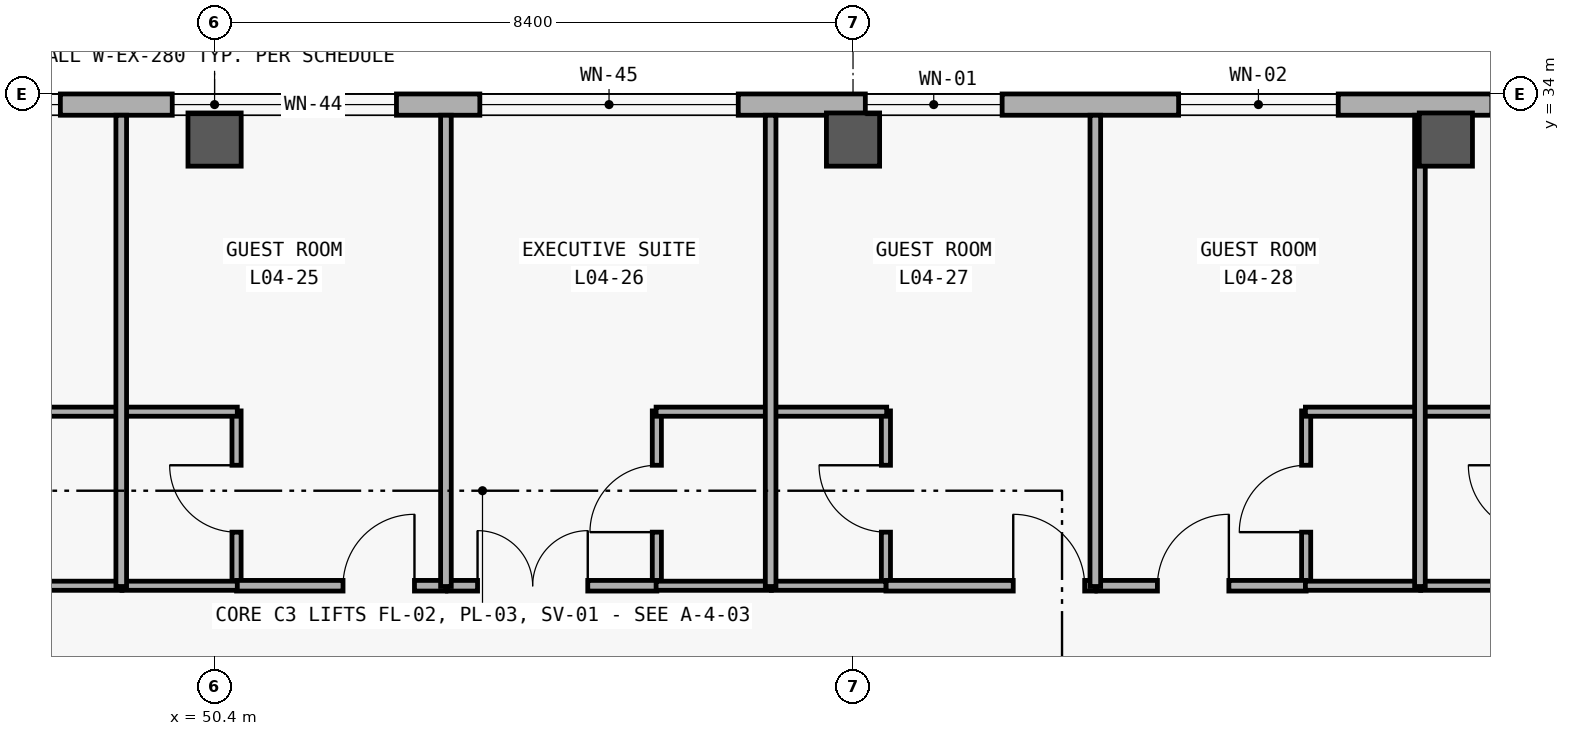
"""IFC4 building model, lengths in metres.
Left out: names, types, materials, properties, quantities, classifications, styles, units other than length and angle.
Written with IfcOpenShell. Run it as: python <this file> out.ifc"""

import sys

from ifc_helpers import new_model, si_unit, direction, frame, frame_2d, origin, origin_2d, place, context, subcontext, project, spatial, rectangle, extrude, element, fill, save


model = new_model("IFC4")
c1 = context("Model", 3, precision=1e-05, world=origin(), true_north=direction((0.0, 1.0)))
c2 = subcontext(c1, "Body", "Model", "MODEL_VIEW")
j1 = project(units=[si_unit("LENGTHUNIT", "METRE"), si_unit("PLANEANGLEUNIT", "RADIAN")], contexts=[c1])
p1 = place(None, origin())
s1 = spatial("IfcSite", under=j1, at=p1, CompositionType="ELEMENT")
p2 = place(p1, origin())
s2 = spatial("IfcBuilding", under=s1, at=p2, CompositionType="ELEMENT")
p3 = place(p2, frame((0.0, 0.0, 19.2)))
s3 = spatial("IfcBuildingStorey", under=s2, at=p3, CompositionType="ELEMENT", Elevation=19.2)
for number, where, z_axis, x_axis in (
    (1, (50.4, 33.4, 0.0), (0.0, 0.0, 1.0), (1.0, 0.0, 0.0)),
    (2, (58.8, 33.4, 0.0), (0.0, 0.0, 1.0), (1.0, 0.0, 0.0)),
    (3, (66.6, 33.4, 0.0), (0.0, 0.0, 1.0), (1.0, 0.0, 0.0)),
):
    element("IfcColumn", number, at=place(p3, frame(where, z_axis=z_axis, x_axis=x_axis)), inside=s3, PredefinedType="COLUMN", context=c2, shape_type="SweptSolid", body=[
        extrude(rectangle(XDim=0.7, YDim=0.7, at=origin_2d()), origin(), (0.0, 0.0, 1.0), 3.6),
    ])
p4 = place(p3, frame((8.68, 33.86, 0.0), z_axis=(0.0, 0.0, 1.0), x_axis=(1.0, 0.0, 0.0)))
e4 = element("IfcWall", 4, at=p4, inside=s3, PredefinedType="SOLIDWALL", context=c2, shape_type="SweptSolid", body=[
    extrude(rectangle(XDim=83.44, YDim=0.28, at=frame_2d((41.72, 0.0))), origin(), (0.0, 0.0, 1.0), 3.32),
])
p5 = place(p4, frame((4.745, 0.0, 0.85)))
e5 = element("IfcOpeningElement", 5, at=p5, cuts=e4, PredefinedType="OPENING", context=c2, shape_type="SweptSolid", body=[
    extrude(rectangle(XDim=1.25, YDim=1.45, at=frame_2d((0.625, 0.725))), frame((0.0, 0.15, 0.0), z_axis=(0.0, -1.0, 0.0), x_axis=(1.0, 0.0, 0.0)), (0.0, 0.0, 1.0), 0.3),
])
p6 = place(p4, frame((11.846, 0.0, 0.85)))
e6 = element("IfcOpeningElement", 6, at=p6, cuts=e4, PredefinedType="OPENING", context=c2, shape_type="SweptSolid", body=[
    extrude(rectangle(XDim=1.78, YDim=1.95, at=frame_2d((0.89, 0.975))), frame((0.0, 0.15, 0.0), z_axis=(0.0, -1.0, 0.0), x_axis=(1.0, 0.0, 0.0)), (0.0, 0.0, 1.0), 0.3),
])
p7 = place(p4, frame((16.068, 0.0, 0.85)))
e7 = element("IfcOpeningElement", 7, at=p7, cuts=e4, PredefinedType="OPENING", context=c2, shape_type="SweptSolid", body=[
    extrude(rectangle(XDim=1.88, YDim=1.95, at=frame_2d((0.94, 0.975))), frame((0.0, 0.15, 0.0), z_axis=(0.0, -1.0, 0.0), x_axis=(1.0, 0.0, 0.0)), (0.0, 0.0, 1.0), 0.3),
])
p8 = place(p4, frame((20.255, 0.0, 0.85)))
e8 = element("IfcOpeningElement", 8, at=p8, cuts=e4, PredefinedType="OPENING", context=c2, shape_type="SweptSolid", body=[
    extrude(rectangle(XDim=2.05, YDim=1.95, at=frame_2d((1.025, 0.975))), frame((0.0, 0.15, 0.0), z_axis=(0.0, -1.0, 0.0), x_axis=(1.0, 0.0, 0.0)), (0.0, 0.0, 1.0), 0.3),
])
p9 = place(p4, frame((24.461, 0.0, 0.85)))
e9 = element("IfcOpeningElement", 9, at=p9, cuts=e4, PredefinedType="OPENING", context=c2, shape_type="SweptSolid", body=[
    extrude(rectangle(XDim=2.18, YDim=1.95, at=frame_2d((1.09, 0.975))), frame((0.0, 0.15, 0.0), z_axis=(0.0, -1.0, 0.0), x_axis=(1.0, 0.0, 0.0)), (0.0, 0.0, 1.0), 0.3),
])
p10 = place(p4, frame((28.633, 0.0, 0.85)))
e10 = element("IfcOpeningElement", 10, at=p10, cuts=e4, PredefinedType="OPENING", context=c2, shape_type="SweptSolid", body=[
    extrude(rectangle(XDim=2.38, YDim=1.95, at=frame_2d((1.19, 0.975))), frame((0.0, 0.15, 0.0), z_axis=(0.0, -1.0, 0.0), x_axis=(1.0, 0.0, 0.0)), (0.0, 0.0, 1.0), 0.3),
])
p11 = place(p4, frame((32.855, 0.0, 0.85)))
e11 = element("IfcOpeningElement", 11, at=p11, cuts=e4, PredefinedType="OPENING", context=c2, shape_type="SweptSolid", body=[
    extrude(rectangle(XDim=2.48, YDim=2.0, at=frame_2d((1.24, 1.0))), frame((0.0, 0.15, 0.0), z_axis=(0.0, -1.0, 0.0), x_axis=(1.0, 0.0, 0.0)), (0.0, 0.0, 1.0), 0.3),
])
p12 = place(p4, frame((37.041, 0.0, 0.85)))
e12 = element("IfcOpeningElement", 12, at=p12, cuts=e4, PredefinedType="OPENING", context=c2, shape_type="SweptSolid", body=[
    extrude(rectangle(XDim=2.65, YDim=2.0, at=frame_2d((1.325, 1.0))), frame((0.0, 0.15, 0.0), z_axis=(0.0, -1.0, 0.0), x_axis=(1.0, 0.0, 0.0)), (0.0, 0.0, 1.0), 0.3),
])
p13 = place(p4, frame((41.163, 0.0, 0.85)))
e13 = element("IfcOpeningElement", 13, at=p13, cuts=e4, PredefinedType="OPENING", context=c2, shape_type="SweptSolid", body=[
    extrude(rectangle(XDim=2.95, YDim=2.05, at=frame_2d((1.475, 1.025))), frame((0.0, 0.15, 0.0), z_axis=(0.0, -1.0, 0.0), x_axis=(1.0, 0.0, 0.0)), (0.0, 0.0, 1.0), 0.3),
])
p14 = place(p4, frame((45.21, 0.0, 0.85)))
e14 = element("IfcOpeningElement", 14, at=p14, cuts=e4, PredefinedType="OPENING", context=c2, shape_type="SweptSolid", body=[
    extrude(rectangle(XDim=3.4, YDim=2.1, at=frame_2d((1.7, 1.05))), frame((0.0, 0.15, 0.0), z_axis=(0.0, -1.0, 0.0), x_axis=(1.0, 0.0, 0.0)), (0.0, 0.0, 1.0), 0.3),
])
p15 = place(p4, frame((50.282, 0.0, 0.85)))
e15 = element("IfcOpeningElement", 15, at=p15, cuts=e4, PredefinedType="OPENING", context=c2, shape_type="SweptSolid", body=[
    extrude(rectangle(XDim=1.8, YDim=1.8, at=frame_2d((0.9, 0.9))), frame((0.0, 0.15, 0.0), z_axis=(0.0, -1.0, 0.0), x_axis=(1.0, 0.0, 0.0)), (0.0, 0.0, 1.0), 0.3),
])
p16 = place(p4, frame((54.404, 0.0, 0.85)))
e16 = element("IfcOpeningElement", 16, at=p16, cuts=e4, PredefinedType="OPENING", context=c2, shape_type="SweptSolid", body=[
    extrude(rectangle(XDim=2.1, YDim=1.8, at=frame_2d((1.05, 0.9))), frame((0.0, 0.15, 0.0), z_axis=(0.0, -1.0, 0.0), x_axis=(1.0, 0.0, 0.0)), (0.0, 0.0, 1.0), 0.3),
])
p17 = place(p4, frame((58.525, 0.0, 0.85)))
e17 = element("IfcOpeningElement", 17, at=p17, cuts=e4, PredefinedType="OPENING", context=c2, shape_type="SweptSolid", body=[
    extrude(rectangle(XDim=2.4, YDim=1.8, at=frame_2d((1.2, 0.9))), frame((0.0, 0.15, 0.0), z_axis=(0.0, -1.0, 0.0), x_axis=(1.0, 0.0, 0.0)), (0.0, 0.0, 1.0), 0.3),
])
p18 = place(p4, frame((62.647, 0.0, 0.85)))
e18 = element("IfcOpeningElement", 18, at=p18, cuts=e4, PredefinedType="OPENING", context=c2, shape_type="SweptSolid", body=[
    extrude(rectangle(XDim=2.7, YDim=1.85, at=frame_2d((1.35, 0.925))), frame((0.0, 0.15, 0.0), z_axis=(0.0, -1.0, 0.0), x_axis=(1.0, 0.0, 0.0)), (0.0, 0.0, 1.0), 0.3),
])
p19 = place(p4, frame((66.769, 0.0, 0.85)))
e19 = element("IfcOpeningElement", 19, at=p19, cuts=e4, PredefinedType="OPENING", context=c2, shape_type="SweptSolid", body=[
    extrude(rectangle(XDim=3.0, YDim=1.9, at=frame_2d((1.5, 0.95))), frame((0.0, 0.15, 0.0), z_axis=(0.0, -1.0, 0.0), x_axis=(1.0, 0.0, 0.0)), (0.0, 0.0, 1.0), 0.3),
])
p20 = place(p4, frame((71.791, 0.0, 0.85)))
e20 = element("IfcOpeningElement", 20, at=p20, cuts=e4, PredefinedType="OPENING", context=c2, shape_type="SweptSolid", body=[
    extrude(rectangle(XDim=1.5, YDim=1.75, at=frame_2d((0.75, 0.875))), frame((0.0, 0.15, 0.0), z_axis=(0.0, -1.0, 0.0), x_axis=(1.0, 0.0, 0.0)), (0.0, 0.0, 1.0), 0.3),
])
p21 = place(p4, frame((75.987, 0.0, 0.85)))
e21 = element("IfcOpeningElement", 21, at=p21, cuts=e4, PredefinedType="OPENING", context=c2, shape_type="SweptSolid", body=[
    extrude(rectangle(XDim=1.65, YDim=1.75, at=frame_2d((0.825, 0.875))), frame((0.0, 0.15, 0.0), z_axis=(0.0, -1.0, 0.0), x_axis=(1.0, 0.0, 0.0)), (0.0, 0.0, 1.0), 0.3),
])
p22 = place(p4, frame((80.109, 0.0, 0.85)))
e22 = element("IfcOpeningElement", 22, at=p22, cuts=e4, PredefinedType="OPENING", context=c2, shape_type="SweptSolid", body=[
    extrude(rectangle(XDim=1.95, YDim=1.75, at=frame_2d((0.975, 0.875))), frame((0.0, 0.15, 0.0), z_axis=(0.0, -1.0, 0.0), x_axis=(1.0, 0.0, 0.0)), (0.0, 0.0, 1.0), 0.3),
])
p23 = place(p3, frame((50.689, 27.52, 0.0), z_axis=(0.0, 0.0, 1.0), x_axis=(0.0, 1.0, 0.0)))
e23 = element("IfcWall", 23, at=p23, inside=s3, PredefinedType="PARTITIONING", context=c2, shape_type="SweptSolid", body=[
    extrude(rectangle(XDim=2.31, YDim=0.12, at=frame_2d((1.155, 0.0))), origin(), (0.0, 0.0, 1.0), 2.48),
])
p24 = place(p23, frame((0.715, 0.0, 0.0)))
e24 = element("IfcOpeningElement", 24, at=p24, cuts=e23, PredefinedType="OPENING", context=c2, shape_type="SweptSolid", body=[
    extrude(rectangle(XDim=0.88, YDim=2.15, at=frame_2d((0.44, 1.075))), frame((0.0, 0.07, 0.0), z_axis=(0.0, -1.0, 0.0), x_axis=(1.0, 0.0, 0.0)), (0.0, 0.0, 1.0), 0.14),
])
p25 = place(p3, frame((56.219, 27.52, 0.0), z_axis=(0.0, 0.0, 1.0), x_axis=(0.0, 1.0, 0.0)))
e25 = element("IfcWall", 25, at=p25, inside=s3, PredefinedType="PARTITIONING", context=c2, shape_type="SweptSolid", body=[
    extrude(rectangle(XDim=2.31, YDim=0.12, at=frame_2d((1.155, 0.0))), origin(), (0.0, 0.0, 1.0), 2.48),
])
p26 = place(p25, frame((0.715, 0.0, 0.0)))
e26 = element("IfcOpeningElement", 26, at=p26, cuts=e25, PredefinedType="OPENING", context=c2, shape_type="SweptSolid", body=[
    extrude(rectangle(XDim=0.88, YDim=2.15, at=frame_2d((0.44, 1.075))), frame((0.0, 0.07, 0.0), z_axis=(0.0, -1.0, 0.0), x_axis=(1.0, 0.0, 0.0)), (0.0, 0.0, 1.0), 0.14),
])
p27 = place(p3, frame((59.233, 27.52, 0.0), z_axis=(0.0, 0.0, 1.0), x_axis=(0.0, 1.0, 0.0)))
e27 = element("IfcWall", 27, at=p27, inside=s3, PredefinedType="PARTITIONING", context=c2, shape_type="SweptSolid", body=[
    extrude(rectangle(XDim=2.31, YDim=0.12, at=frame_2d((1.155, 0.0))), origin(), (0.0, 0.0, 1.0), 2.48),
])
p28 = place(p27, frame((0.715, 0.0, 0.0)))
e28 = element("IfcOpeningElement", 28, at=p28, cuts=e27, PredefinedType="OPENING", context=c2, shape_type="SweptSolid", body=[
    extrude(rectangle(XDim=0.88, YDim=2.15, at=frame_2d((0.44, 1.075))), frame((0.0, 0.07, 0.0), z_axis=(0.0, -1.0, 0.0), x_axis=(1.0, 0.0, 0.0)), (0.0, 0.0, 1.0), 0.14),
])
p29 = place(p3, frame((64.762, 27.52, 0.0), z_axis=(0.0, 0.0, 1.0), x_axis=(0.0, 1.0, 0.0)))
e29 = element("IfcWall", 29, at=p29, inside=s3, PredefinedType="PARTITIONING", context=c2, shape_type="SweptSolid", body=[
    extrude(rectangle(XDim=2.31, YDim=0.12, at=frame_2d((1.155, 0.0))), origin(), (0.0, 0.0, 1.0), 2.48),
])
p30 = place(p29, frame((0.715, 0.0, 0.0)))
e30 = element("IfcOpeningElement", 30, at=p30, cuts=e29, PredefinedType="OPENING", context=c2, shape_type="SweptSolid", body=[
    extrude(rectangle(XDim=0.88, YDim=2.15, at=frame_2d((0.44, 1.075))), frame((0.0, 0.07, 0.0), z_axis=(0.0, -1.0, 0.0), x_axis=(1.0, 0.0, 0.0)), (0.0, 0.0, 1.0), 0.14),
])
p31 = place(p3, frame((50.689, 27.53, 0.0), z_axis=(0.0, 0.0, 1.0), x_axis=(1.0, 0.0, 0.0)))
e31 = element("IfcWall", 31, at=p31, inside=s3, PredefinedType="PARTITIONING", context=c2, shape_type="SweptSolid", body=[
    extrude(rectangle(XDim=2.755, YDim=0.14, at=frame_2d((1.377, 0.0))), origin(), (0.0, 0.0, 1.0), 2.48),
])
p32 = place(p31, frame((1.401, 0.0, 0.0)))
e32 = element("IfcOpeningElement", 32, at=p32, cuts=e31, PredefinedType="OPENING", context=c2, shape_type="SweptSolid", body=[
    extrude(rectangle(XDim=0.94, YDim=2.2, at=frame_2d((0.47, 1.1))), frame((0.0, 0.08, 0.0), z_axis=(0.0, -1.0, 0.0), x_axis=(1.0, 0.0, 0.0)), (0.0, 0.0, 1.0), 0.16),
])
p33 = place(p3, frame((53.464, 27.53, 0.0), z_axis=(0.0, 0.0, 1.0), x_axis=(1.0, 0.0, 0.0)))
e33 = element("IfcWall", 33, at=p33, inside=s3, PredefinedType="PARTITIONING", context=c2, shape_type="SweptSolid", body=[
    extrude(rectangle(XDim=2.755, YDim=0.14, at=frame_2d((1.377, 0.0))), origin(), (0.0, 0.0, 1.0), 2.48),
])
p34 = place(p33, frame((0.396, 0.0, 0.0)))
e34 = element("IfcOpeningElement", 34, at=p34, cuts=e33, PredefinedType="OPENING", context=c2, shape_type="SweptSolid", body=[
    extrude(rectangle(XDim=1.45, YDim=2.3, at=frame_2d((0.725, 1.15))), frame((0.0, 0.08, 0.0), z_axis=(0.0, -1.0, 0.0), x_axis=(1.0, 0.0, 0.0)), (0.0, 0.0, 1.0), 0.16),
])
p35 = place(p3, frame((59.233, 27.53, 0.0), z_axis=(0.0, 0.0, 1.0), x_axis=(1.0, 0.0, 0.0)))
e35 = element("IfcWall", 35, at=p35, inside=s3, PredefinedType="PARTITIONING", context=c2, shape_type="SweptSolid", body=[
    extrude(rectangle(XDim=2.755, YDim=0.14, at=frame_2d((1.377, 0.0))), origin(), (0.0, 0.0, 1.0), 2.48),
])
p36 = place(p35, frame((1.675, 0.0, 0.0)))
e36 = element("IfcOpeningElement", 36, at=p36, cuts=e35, PredefinedType="OPENING", context=c2, shape_type="SweptSolid", body=[
    extrude(rectangle(XDim=0.94, YDim=2.2, at=frame_2d((0.47, 1.1))), frame((0.0, 0.08, 0.0), z_axis=(0.0, -1.0, 0.0), x_axis=(1.0, 0.0, 0.0)), (0.0, 0.0, 1.0), 0.16),
])
p37 = place(p3, frame((62.008, 27.53, 0.0), z_axis=(0.0, 0.0, 1.0), x_axis=(1.0, 0.0, 0.0)))
e37 = element("IfcWall", 37, at=p37, inside=s3, PredefinedType="PARTITIONING", context=c2, shape_type="SweptSolid", body=[
    extrude(rectangle(XDim=2.754, YDim=0.14, at=frame_2d((1.377, 0.0))), origin(), (0.0, 0.0, 1.0), 2.48),
])
p38 = place(p37, frame((0.797, 0.0, 0.0)))
e38 = element("IfcOpeningElement", 38, at=p38, cuts=e37, PredefinedType="OPENING", context=c2, shape_type="SweptSolid", body=[
    extrude(rectangle(XDim=0.94, YDim=2.2, at=frame_2d((0.47, 1.1))), frame((0.0, 0.08, 0.0), z_axis=(0.0, -1.0, 0.0), x_axis=(1.0, 0.0, 0.0)), (0.0, 0.0, 1.0), 0.16),
])
for number, where, z_axis, x_axis in (
    (39, (47.665, 27.53, 0.0), (0.0, 0.0, 1.0), (1.0, 0.0, 0.0)),
    (40, (47.665, 29.82, 0.0), (0.0, 0.0, 1.0), (1.0, 0.0, 0.0)),
):
    element("IfcWall", number, at=place(p3, frame(where, z_axis=z_axis, x_axis=x_axis)), inside=s3, PredefinedType="PARTITIONING", context=c2, shape_type="SweptSolid", body=[
        extrude(rectangle(XDim=1.517, YDim=0.12, at=frame_2d((0.758, 0.0))), origin(), (0.0, 0.0, 1.0), 2.48),
    ])
for number, where, z_axis, x_axis in (
    (41, (49.182, 27.53, 0.0), (0.0, 0.0, 1.0), (1.0, 0.0, 0.0)),
    (42, (49.182, 29.82, 0.0), (0.0, 0.0, 1.0), (1.0, 0.0, 0.0)),
    (43, (56.209, 27.53, 0.0), (0.0, 0.0, 1.0), (1.0, 0.0, 0.0)),
    (44, (56.209, 29.82, 0.0), (0.0, 0.0, 1.0), (1.0, 0.0, 0.0)),
):
    element("IfcWall", number, at=place(p3, frame(where, z_axis=z_axis, x_axis=x_axis)), inside=s3, PredefinedType="PARTITIONING", context=c2, shape_type="SweptSolid", body=[
        extrude(rectangle(XDim=1.517, YDim=0.12, at=frame_2d((0.759, 0.0))), origin(), (0.0, 0.0, 1.0), 2.48),
    ])
p39 = place(p3, frame((57.726, 27.53, 0.0), z_axis=(0.0, 0.0, 1.0), x_axis=(1.0, 0.0, 0.0)))
e45 = element("IfcWall", 45, at=p39, inside=s3, PredefinedType="PARTITIONING", context=c2, shape_type="SweptSolid", body=[
    extrude(rectangle(XDim=1.507, YDim=0.12, at=frame_2d((0.753, 0.0))), origin(), (0.0, 0.0, 1.0), 2.48),
])
p40 = place(p3, frame((57.726, 29.82, 0.0), z_axis=(0.0, 0.0, 1.0), x_axis=(1.0, 0.0, 0.0)))
e46 = element("IfcWall", 46, at=p40, inside=s3, PredefinedType="PARTITIONING", context=c2, shape_type="SweptSolid", body=[
    extrude(rectangle(XDim=1.517, YDim=0.12, at=frame_2d((0.758, 0.0))), origin(), (0.0, 0.0, 1.0), 2.48),
])
for number, where, z_axis, x_axis in (
    (47, (64.752, 27.53, 0.0), (0.0, 0.0, 1.0), (1.0, 0.0, 0.0)),
    (48, (64.752, 29.82, 0.0), (0.0, 0.0, 1.0), (1.0, 0.0, 0.0)),
):
    element("IfcWall", number, at=place(p3, frame(where, z_axis=z_axis, x_axis=x_axis)), inside=s3, PredefinedType="PARTITIONING", context=c2, shape_type="SweptSolid", body=[
        extrude(rectangle(XDim=1.517, YDim=0.12, at=frame_2d((0.759, 0.0))), origin(), (0.0, 0.0, 1.0), 2.48),
    ])
for number, where, z_axis, x_axis in (
    (49, (66.269, 27.53, 0.0), (0.0, 0.0, 1.0), (1.0, 0.0, 0.0)),
    (50, (66.269, 29.82, 0.0), (0.0, 0.0, 1.0), (1.0, 0.0, 0.0)),
):
    element("IfcWall", number, at=place(p3, frame(where, z_axis=z_axis, x_axis=x_axis)), inside=s3, PredefinedType="PARTITIONING", context=c2, shape_type="SweptSolid", body=[
        extrude(rectangle(XDim=1.517, YDim=0.12, at=frame_2d((0.758, 0.0))), origin(), (0.0, 0.0, 1.0), 2.48),
    ])
for number, where, z_axis, x_axis in (
    (51, (49.172, 27.52, 0.0), (0.0, 0.0, 1.0), (0.0, 1.0, 0.0)),
    (52, (53.444, 27.52, 0.0), (0.0, 0.0, 1.0), (0.0, 1.0, 0.0)),
    (53, (57.716, 27.52, 0.0), (0.0, 0.0, 1.0), (0.0, 1.0, 0.0)),
    (54, (61.988, 27.52, 0.0), (0.0, 0.0, 1.0), (0.0, 1.0, 0.0)),
    (55, (66.259, 27.52, 0.0), (0.0, 0.0, 1.0), (0.0, 1.0, 0.0)),
):
    element("IfcWall", number, at=place(p3, frame(where, z_axis=z_axis, x_axis=x_axis)), inside=s3, PredefinedType="PARTITIONING", context=c2, shape_type="SweptSolid", body=[
        extrude(rectangle(XDim=6.2, YDim=0.14, at=frame_2d((3.1, 0.0))), origin(), (0.0, 0.0, 1.0), 2.48),
    ])
p41 = place(p12, origin())
e56 = element("IfcWindow", 56, at=p41, inside=s3, PartitioningType="SINGLE_PANEL", PredefinedType="WINDOW", context=c2, shape_type="SweptSolid", body=[
    extrude(rectangle(XDim=2.65, YDim=2.0, at=frame_2d((1.325, 1.0))), frame((0.0, 0.03, 0.0), z_axis=(0.0, -1.0, 0.0), x_axis=(1.0, 0.0, 0.0)), (0.0, 0.0, 1.0), 0.06),
])
fill(e12, e56)
p42 = place(p13, origin())
e57 = element("IfcWindow", 57, at=p42, inside=s3, PartitioningType="SINGLE_PANEL", PredefinedType="WINDOW", context=c2, shape_type="SweptSolid", body=[
    extrude(rectangle(XDim=2.95, YDim=2.05, at=frame_2d((1.475, 1.025))), frame((0.0, 0.03, 0.0), z_axis=(0.0, -1.0, 0.0), x_axis=(1.0, 0.0, 0.0)), (0.0, 0.0, 1.0), 0.06),
])
fill(e13, e57)
p43 = place(p14, origin())
e58 = element("IfcWindow", 58, at=p43, inside=s3, PartitioningType="SINGLE_PANEL", PredefinedType="WINDOW", context=c2, shape_type="SweptSolid", body=[
    extrude(rectangle(XDim=3.4, YDim=2.1, at=frame_2d((1.7, 1.05))), frame((0.0, 0.03, 0.0), z_axis=(0.0, -1.0, 0.0), x_axis=(1.0, 0.0, 0.0)), (0.0, 0.0, 1.0), 0.06),
])
fill(e14, e58)
p44 = place(p15, origin())
e59 = element("IfcWindow", 59, at=p44, inside=s3, PartitioningType="SINGLE_PANEL", PredefinedType="WINDOW", context=c2, shape_type="SweptSolid", body=[
    extrude(rectangle(XDim=1.8, YDim=1.8, at=frame_2d((0.9, 0.9))), frame((0.0, 0.03, 0.0), z_axis=(0.0, -1.0, 0.0), x_axis=(1.0, 0.0, 0.0)), (0.0, 0.0, 1.0), 0.06),
])
fill(e15, e59)
p45 = place(p16, origin())
e60 = element("IfcWindow", 60, at=p45, inside=s3, PartitioningType="SINGLE_PANEL", PredefinedType="WINDOW", context=c2, shape_type="SweptSolid", body=[
    extrude(rectangle(XDim=2.1, YDim=1.8, at=frame_2d((1.05, 0.9))), frame((0.0, 0.03, 0.0), z_axis=(0.0, -1.0, 0.0), x_axis=(1.0, 0.0, 0.0)), (0.0, 0.0, 1.0), 0.06),
])
fill(e16, e60)
p46 = place(p24, origin())
e61 = element("IfcDoor", 61, at=p46, inside=s3, OperationType="SINGLE_SWING_RIGHT", PredefinedType="DOOR", context=c2, shape_type="SweptSolid", body=[
    extrude(rectangle(XDim=0.88, YDim=2.15, at=frame_2d((0.44, 1.075))), frame((0.0, 0.025, 0.0), z_axis=(0.0, -1.0, 0.0), x_axis=(1.0, 0.0, 0.0)), (0.0, 0.0, 1.0), 0.05),
])
fill(e24, e61)
p47 = place(p26, origin())
e62 = element("IfcDoor", 62, at=p47, inside=s3, OperationType="SINGLE_SWING_LEFT", PredefinedType="DOOR", context=c2, shape_type="SweptSolid", body=[
    extrude(rectangle(XDim=0.88, YDim=2.15, at=frame_2d((0.44, 1.075))), frame((0.0, 0.025, 0.0), z_axis=(0.0, -1.0, 0.0), x_axis=(1.0, 0.0, 0.0)), (0.0, 0.0, 1.0), 0.05),
])
fill(e26, e62)
p48 = place(p28, origin())
e63 = element("IfcDoor", 63, at=p48, inside=s3, OperationType="SINGLE_SWING_RIGHT", PredefinedType="DOOR", context=c2, shape_type="SweptSolid", body=[
    extrude(rectangle(XDim=0.88, YDim=2.15, at=frame_2d((0.44, 1.075))), frame((0.0, 0.025, 0.0), z_axis=(0.0, -1.0, 0.0), x_axis=(1.0, 0.0, 0.0)), (0.0, 0.0, 1.0), 0.05),
])
fill(e28, e63)
p49 = place(p30, origin())
e64 = element("IfcDoor", 64, at=p49, inside=s3, OperationType="SINGLE_SWING_LEFT", PredefinedType="DOOR", context=c2, shape_type="SweptSolid", body=[
    extrude(rectangle(XDim=0.88, YDim=2.15, at=frame_2d((0.44, 1.075))), frame((0.0, 0.025, 0.0), z_axis=(0.0, -1.0, 0.0), x_axis=(1.0, 0.0, 0.0)), (0.0, 0.0, 1.0), 0.05),
])
fill(e30, e64)
p50 = place(p32, origin())
e65 = element("IfcDoor", 65, at=p50, inside=s3, OperationType="SINGLE_SWING_RIGHT", PredefinedType="DOOR", context=c2, shape_type="SweptSolid", body=[
    extrude(rectangle(XDim=0.94, YDim=2.2, at=frame_2d((0.47, 1.1))), frame((0.0, 0.025, 0.0), z_axis=(0.0, -1.0, 0.0), x_axis=(1.0, 0.0, 0.0)), (0.0, 0.0, 1.0), 0.05),
])
fill(e32, e65)
p51 = place(p34, origin())
e66 = element("IfcDoor", 66, at=p51, inside=s3, OperationType="DOUBLE_DOOR_SINGLE_SWING", PredefinedType="DOOR", context=c2, shape_type="SweptSolid", body=[
    extrude(rectangle(XDim=1.45, YDim=2.3, at=frame_2d((0.725, 1.15))), frame((0.0, 0.025, 0.0), z_axis=(0.0, -1.0, 0.0), x_axis=(1.0, 0.0, 0.0)), (0.0, 0.0, 1.0), 0.05),
])
fill(e34, e66)
p52 = place(p36, origin())
e67 = element("IfcDoor", 67, at=p52, inside=s3, OperationType="SINGLE_SWING_LEFT", PredefinedType="DOOR", context=c2, shape_type="SweptSolid", body=[
    extrude(rectangle(XDim=0.94, YDim=2.2, at=frame_2d((0.47, 1.1))), frame((0.0, 0.025, 0.0), z_axis=(0.0, -1.0, 0.0), x_axis=(1.0, 0.0, 0.0)), (0.0, 0.0, 1.0), 0.05),
])
fill(e36, e67)
p53 = place(p38, origin())
e68 = element("IfcDoor", 68, at=p53, inside=s3, OperationType="SINGLE_SWING_RIGHT", PredefinedType="DOOR", context=c2, shape_type="SweptSolid", body=[
    extrude(rectangle(XDim=0.94, YDim=2.2, at=frame_2d((0.47, 1.1))), frame((0.0, 0.025, 0.0), z_axis=(0.0, -1.0, 0.0), x_axis=(1.0, 0.0, 0.0)), (0.0, 0.0, 1.0), 0.05),
])
fill(e38, e68)
save(model, sys.argv[1])
